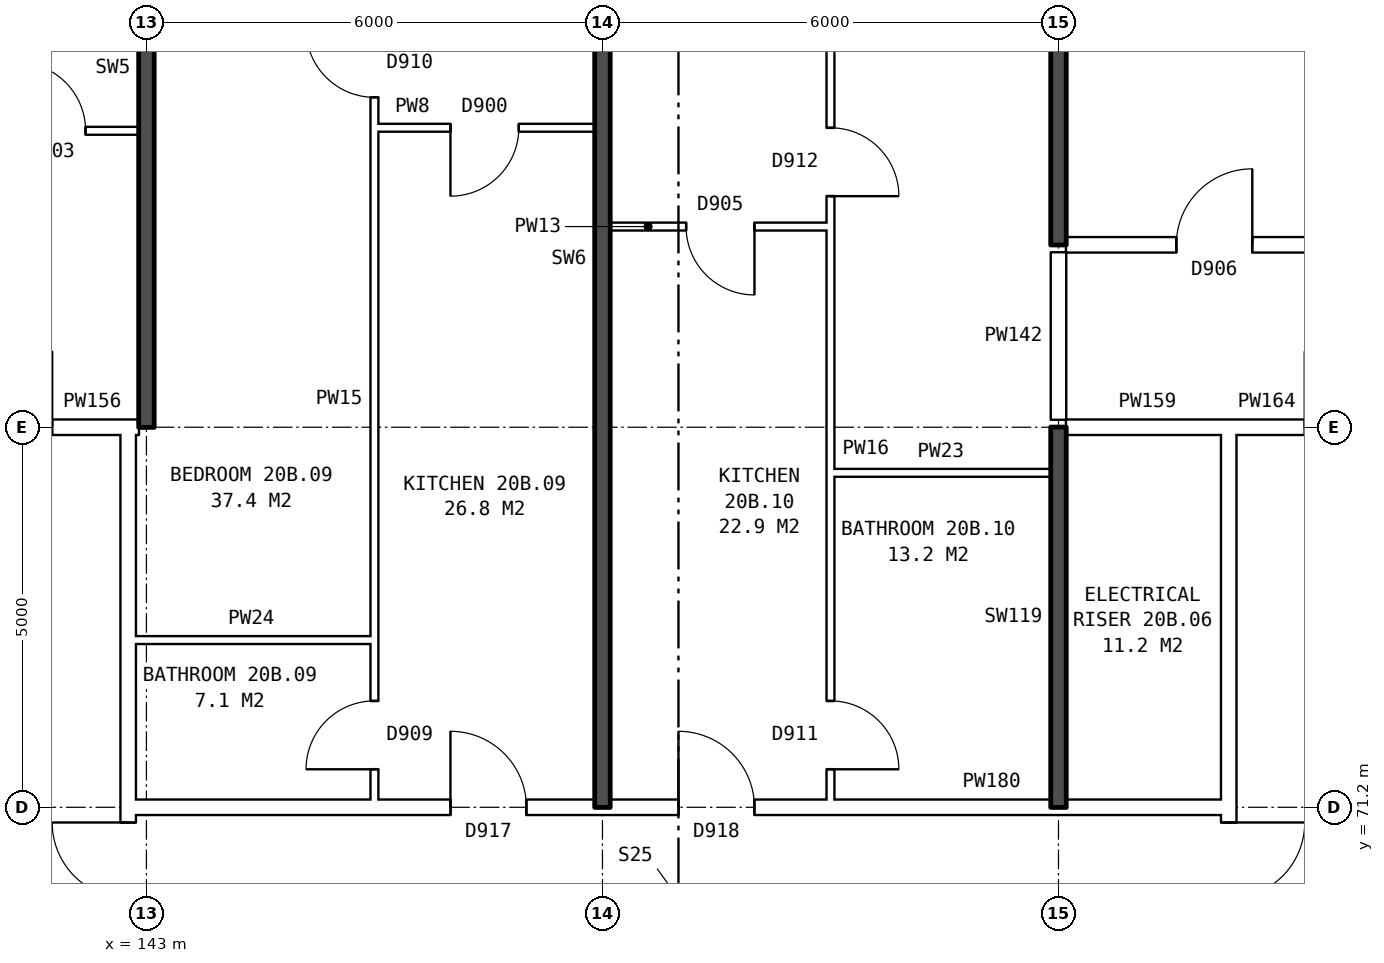
"""IFC4 building model, lengths in metres.
Left out: names, types, materials, properties, quantities, classifications, styles, units other than length and angle.
Written with IfcOpenShell. Run it as: python <this file> out.ifc"""

import sys

from ifc_helpers import new_model, si_unit, direction, frame, frame_2d, origin, place, context, subcontext, project, spatial, rectangle, extrude, element, fill, save


model = new_model("IFC4")
c1 = context("Model", 3, precision=1e-05, world=origin(), true_north=direction((0.0, 1.0)))
c2 = subcontext(c1, "Body", "Model", "MODEL_VIEW")
j1 = project(units=[si_unit("LENGTHUNIT", "METRE"), si_unit("PLANEANGLEUNIT", "RADIAN")], contexts=[c1])
p1 = place(None, origin())
s1 = spatial("IfcSite", under=j1, at=p1, CompositionType="ELEMENT")
p2 = place(p1, origin())
s2 = spatial("IfcBuilding", under=s1, at=p2, CompositionType="ELEMENT")
p3 = place(p2, frame((0.0, 0.0, 74.7)))
s3 = spatial("IfcBuildingStorey", under=s2, at=p3, CompositionType="ELEMENT", Elevation=74.7)
p4 = place(p3, frame((142.76, 63.9, 0.0), z_axis=(0.0, 0.0, 1.0), x_axis=(0.0, 1.0, 0.0)))
e1 = element("IfcWall", 1, at=p4, inside=s3, PredefinedType="PARTITIONING", context=c2, shape_type="SweptSolid", body=[
    extrude(rectangle(XDim=12.2, YDim=0.2, at=frame_2d((6.1, 0.0))), origin(), (0.0, 0.0, 1.0), 2.85),
])
p5 = place(p4, frame((5.1, 0.0, 0.0)))
e2 = element("IfcOpeningElement", 2, at=p5, cuts=e1, PredefinedType="OPENING", context=c2, shape_type="SweptSolid", body=[
    extrude(rectangle(XDim=2.0, YDim=2.1, at=frame_2d((1.0, 1.05))), frame((0.0, 0.11, 0.0), z_axis=(0.0, -1.0, 0.0), x_axis=(1.0, 0.0, 0.0)), (0.0, 0.0, 1.0), 0.22),
])
p6 = place(p3, frame((157.24, 63.9, 0.0), z_axis=(0.0, 0.0, 1.0), x_axis=(0.0, 1.0, 0.0)))
e3 = element("IfcWall", 3, at=p6, inside=s3, PredefinedType="PARTITIONING", context=c2, shape_type="SweptSolid", body=[
    extrude(rectangle(XDim=12.2, YDim=0.2, at=frame_2d((6.1, 0.0))), origin(), (0.0, 0.0, 1.0), 2.85),
])
p7 = place(p6, frame((5.1, 0.0, 0.0)))
e4 = element("IfcOpeningElement", 4, at=p7, cuts=e3, PredefinedType="OPENING", context=c2, shape_type="SweptSolid", body=[
    extrude(rectangle(XDim=2.0, YDim=2.1, at=frame_2d((1.0, 1.05))), frame((0.0, 0.11, 0.0), z_axis=(0.0, -1.0, 0.0), x_axis=(1.0, 0.0, 0.0)), (0.0, 0.0, 1.0), 0.22),
])
p8 = place(p3, frame((142.76, 71.2, 0.0), z_axis=(0.0, 0.0, 1.0), x_axis=(1.0, 0.0, 0.0)))
e5 = element("IfcWall", 5, at=p8, inside=s3, PredefinedType="PARTITIONING", context=c2, shape_type="SweptSolid", body=[
    extrude(rectangle(XDim=14.48, YDim=0.2, at=frame_2d((7.24, 0.0))), origin(), (0.0, 0.0, 1.0), 2.85),
])
p9 = place(p8, frame((4.24, 0.0, 0.0)))
e6 = element("IfcOpeningElement", 6, at=p9, cuts=e5, PredefinedType="OPENING", context=c2, shape_type="SweptSolid", body=[
    extrude(rectangle(XDim=1.0, YDim=2.1, at=frame_2d((0.5, 1.05))), frame((0.0, 0.11, 0.0), z_axis=(0.0, -1.0, 0.0), x_axis=(1.0, 0.0, 0.0)), (0.0, 0.0, 1.0), 0.22),
])
p10 = place(p8, frame((7.24, 0.0, 0.0)))
e7 = element("IfcOpeningElement", 7, at=p10, cuts=e5, PredefinedType="OPENING", context=c2, shape_type="SweptSolid", body=[
    extrude(rectangle(XDim=1.0, YDim=2.1, at=frame_2d((0.5, 1.05))), frame((0.0, 0.11, 0.0), z_axis=(0.0, -1.0, 0.0), x_axis=(1.0, 0.0, 0.0)), (0.0, 0.0, 1.0), 0.22),
])
p11 = place(p3, frame((142.76, 73.4, 0.0), z_axis=(0.0, 0.0, 1.0), x_axis=(1.0, 0.0, 0.0)))
e8 = element("IfcWall", 8, at=p11, inside=s3, PredefinedType="PARTITIONING", context=c2, shape_type="SweptSolid", body=[
    extrude(rectangle(XDim=3.24, YDim=0.1, at=frame_2d((1.62, 0.0))), origin(), (0.0, 0.0, 1.0), 2.85),
])
p12 = place(p3, frame((152.0, 75.6, 0.0), z_axis=(0.0, 0.0, 1.0), x_axis=(1.0, 0.0, 0.0)))
e9 = element("IfcWall", 9, at=p12, inside=s3, PredefinedType="PARTITIONING", context=c2, shape_type="SweptSolid", body=[
    extrude(rectangle(XDim=2.9, YDim=0.1, at=frame_2d((1.45, 0.0))), origin(), (0.0, 0.0, 1.0), 2.85),
])
p13 = place(p3, frame((139.76, 76.2, 0.0), z_axis=(0.0, 0.0, 1.0), x_axis=(1.0, 0.0, 0.0)))
e10 = element("IfcWall", 10, at=p13, inside=s3, PredefinedType="PARTITIONING", context=c2, shape_type="SweptSolid", body=[
    extrude(rectangle(XDim=3.0, YDim=0.2, at=frame_2d((1.5, 0.0))), origin(), (0.0, 0.0, 1.0), 2.85),
])
p14 = place(p13, frame((1.0, 0.0, 0.0)))
e11 = element("IfcOpeningElement", 11, at=p14, cuts=e10, PredefinedType="OPENING", context=c2, shape_type="SweptSolid", body=[
    extrude(rectangle(XDim=1.0, YDim=2.1, at=frame_2d((0.5, 1.05))), frame((0.0, 0.11, 0.0), z_axis=(0.0, -1.0, 0.0), x_axis=(1.0, 0.0, 0.0)), (0.0, 0.0, 1.0), 0.22),
])
p15 = place(p3, frame((142.76, 76.2, 0.0), z_axis=(0.0, 0.0, 1.0), x_axis=(1.0, 0.0, 0.0)))
e12 = element("IfcWall", 12, at=p15, inside=s3, PredefinedType="PARTITIONING", context=c2, shape_type="SweptSolid", body=[
    extrude(rectangle(XDim=0.14, YDim=0.2, at=frame_2d((0.07, 0.0))), origin(), (0.0, 0.0, 1.0), 2.85),
])
p16 = place(p3, frame((155.1, 76.2, 0.0), z_axis=(0.0, 0.0, 1.0), x_axis=(1.0, 0.0, 0.0)))
e13 = element("IfcWall", 13, at=p16, inside=s3, PredefinedType="PARTITIONING", context=c2, shape_type="SweptSolid", body=[
    extrude(rectangle(XDim=2.14, YDim=0.2, at=frame_2d((1.07, 0.0))), origin(), (0.0, 0.0, 1.0), 2.85),
])
p17 = place(p3, frame((157.24, 76.2, 0.0), z_axis=(0.0, 0.0, 1.0), x_axis=(1.0, 0.0, 0.0)))
e14 = element("IfcWall", 14, at=p17, inside=s3, PredefinedType="PARTITIONING", context=c2, shape_type="SweptSolid", body=[
    extrude(rectangle(XDim=3.0, YDim=0.2, at=frame_2d((1.5, 0.0))), origin(), (0.0, 0.0, 1.0), 2.85),
])
p18 = place(p17, frame((1.0, 0.0, 0.0)))
e15 = element("IfcOpeningElement", 15, at=p18, cuts=e14, PredefinedType="OPENING", context=c2, shape_type="SweptSolid", body=[
    extrude(rectangle(XDim=1.0, YDim=2.1, at=frame_2d((0.5, 1.05))), frame((0.0, 0.11, 0.0), z_axis=(0.0, -1.0, 0.0), x_axis=(1.0, 0.0, 0.0)), (0.0, 0.0, 1.0), 0.22),
])
p19 = place(p3, frame((155.1, 78.6, 0.0), z_axis=(0.0, 0.0, 1.0), x_axis=(1.0, 0.0, 0.0)))
e16 = element("IfcWall", 16, at=p19, inside=s3, PredefinedType="PARTITIONING", context=c2, shape_type="SweptSolid", body=[
    extrude(rectangle(XDim=19.79, YDim=0.2, at=frame_2d((9.895, 0.0))), origin(), (0.0, 0.0, 1.0), 2.85),
])
p20 = place(p19, frame((1.45, 0.0, 0.0)))
e17 = element("IfcOpeningElement", 17, at=p20, cuts=e16, PredefinedType="OPENING", context=c2, shape_type="SweptSolid", body=[
    extrude(rectangle(XDim=1.0, YDim=2.1, at=frame_2d((0.5, 1.05))), frame((0.0, 0.11, 0.0), z_axis=(0.0, -1.0, 0.0), x_axis=(1.0, 0.0, 0.0)), (0.0, 0.0, 1.0), 0.22),
])
p21 = place(p19, frame((9.6, 0.0, 0.0)))
e18 = element("IfcOpeningElement", 18, at=p21, cuts=e16, PredefinedType="OPENING", context=c2, shape_type="SweptSolid", body=[
    extrude(rectangle(XDim=1.0, YDim=2.1, at=frame_2d((0.5, 1.05))), frame((0.0, 0.11, 0.0), z_axis=(0.0, -1.0, 0.0), x_axis=(1.0, 0.0, 0.0)), (0.0, 0.0, 1.0), 0.22),
])
p22 = place(p19, frame((13.2, 0.0, 0.0)))
e19 = element("IfcOpeningElement", 19, at=p22, cuts=e16, PredefinedType="OPENING", context=c2, shape_type="SweptSolid", body=[
    extrude(rectangle(XDim=1.0, YDim=2.1, at=frame_2d((0.5, 1.05))), frame((0.0, 0.11, 0.0), z_axis=(0.0, -1.0, 0.0), x_axis=(1.0, 0.0, 0.0)), (0.0, 0.0, 1.0), 0.22),
])
p23 = place(p3, frame((149.1, 78.84, 0.0), z_axis=(0.0, 0.0, 1.0), x_axis=(1.0, 0.0, 0.0)))
e20 = element("IfcWall", 20, at=p23, inside=s3, PredefinedType="PARTITIONING", context=c2, shape_type="SweptSolid", body=[
    extrude(rectangle(XDim=2.9, YDim=0.1, at=frame_2d((1.45, 0.0))), origin(), (0.0, 0.0, 1.0), 2.85),
])
p24 = place(p23, frame((1.0, 0.0, 0.0)))
e21 = element("IfcOpeningElement", 21, at=p24, cuts=e20, PredefinedType="OPENING", context=c2, shape_type="SweptSolid", body=[
    extrude(rectangle(XDim=0.9, YDim=2.1, at=frame_2d((0.45, 1.05))), frame((0.0, 0.06, 0.0), z_axis=(0.0, -1.0, 0.0), x_axis=(1.0, 0.0, 0.0)), (0.0, 0.0, 1.0), 0.12),
])
p25 = place(p3, frame((137.1, 80.1, 0.0), z_axis=(0.0, 0.0, 1.0), x_axis=(1.0, 0.0, 0.0)))
e22 = element("IfcWall", 22, at=p25, inside=s3, PredefinedType="PARTITIONING", context=c2, shape_type="SweptSolid", body=[
    extrude(rectangle(XDim=5.8, YDim=0.1, at=frame_2d((2.9, 0.0))), origin(), (0.0, 0.0, 1.0), 2.85),
])
p26 = place(p25, frame((1.3, 0.0, 0.0)))
e23 = element("IfcOpeningElement", 23, at=p26, cuts=e22, PredefinedType="OPENING", context=c2, shape_type="SweptSolid", body=[
    extrude(rectangle(XDim=0.9, YDim=2.1, at=frame_2d((0.45, 1.05))), frame((0.0, 0.06, 0.0), z_axis=(0.0, -1.0, 0.0), x_axis=(1.0, 0.0, 0.0)), (0.0, 0.0, 1.0), 0.12),
])
p27 = place(p25, frame((4.2, 0.0, 0.0)))
e24 = element("IfcOpeningElement", 24, at=p27, cuts=e22, PredefinedType="OPENING", context=c2, shape_type="SweptSolid", body=[
    extrude(rectangle(XDim=0.9, YDim=2.1, at=frame_2d((0.45, 1.05))), frame((0.0, 0.06, 0.0), z_axis=(0.0, -1.0, 0.0), x_axis=(1.0, 0.0, 0.0)), (0.0, 0.0, 1.0), 0.12),
])
p28 = place(p3, frame((146.0, 80.14, 0.0), z_axis=(0.0, 0.0, 1.0), x_axis=(1.0, 0.0, 0.0)))
e25 = element("IfcWall", 25, at=p28, inside=s3, PredefinedType="PARTITIONING", context=c2, shape_type="SweptSolid", body=[
    extrude(rectangle(XDim=2.9, YDim=0.1, at=frame_2d((1.45, 0.0))), origin(), (0.0, 0.0, 1.0), 2.85),
])
p29 = place(p28, frame((1.0, 0.0, 0.0)))
e26 = element("IfcOpeningElement", 26, at=p29, cuts=e25, PredefinedType="OPENING", context=c2, shape_type="SweptSolid", body=[
    extrude(rectangle(XDim=0.9, YDim=2.1, at=frame_2d((0.45, 1.05))), frame((0.0, 0.06, 0.0), z_axis=(0.0, -1.0, 0.0), x_axis=(1.0, 0.0, 0.0)), (0.0, 0.0, 1.0), 0.12),
])
p30 = place(p3, frame((143.0, 76.2, 0.0), z_axis=(0.0, 0.0, 1.0), x_axis=(0.0, 1.0, 0.0)))
e27 = element("IfcWall", 27, at=p30, inside=s3, PredefinedType="SOLIDWALL", context=c2, shape_type="SweptSolid", body=[
    extrude(rectangle(XDim=9.44, YDim=0.2, at=frame_2d((4.72, 0.0))), origin(), (0.0, 0.0, 1.0), 2.85),
])
p31 = place(p3, frame((146.0, 71.3, 0.0), z_axis=(0.0, 0.0, 1.0), x_axis=(0.0, 1.0, 0.0)))
e28 = element("IfcWall", 28, at=p31, inside=s3, PredefinedType="PARTITIONING", context=c2, shape_type="SweptSolid", body=[
    extrude(rectangle(XDim=14.34, YDim=0.1, at=frame_2d((7.17, 0.0))), origin(), (0.0, 0.0, 1.0), 2.85),
])
p32 = place(p31, frame((9.24, 0.0, 0.0)))
e29 = element("IfcOpeningElement", 29, at=p32, cuts=e28, PredefinedType="OPENING", context=c2, shape_type="SweptSolid", body=[
    extrude(rectangle(XDim=0.9, YDim=2.1, at=frame_2d((0.45, 1.05))), frame((0.0, 0.06, 0.0), z_axis=(0.0, -1.0, 0.0), x_axis=(1.0, 0.0, 0.0)), (0.0, 0.0, 1.0), 0.12),
])
p33 = place(p31, frame((0.4, 0.0, 0.0)))
e30 = element("IfcOpeningElement", 30, at=p33, cuts=e28, PredefinedType="OPENING", context=c2, shape_type="SweptSolid", body=[
    extrude(rectangle(XDim=0.9, YDim=2.1, at=frame_2d((0.45, 1.05))), frame((0.0, 0.06, 0.0), z_axis=(0.0, -1.0, 0.0), x_axis=(1.0, 0.0, 0.0)), (0.0, 0.0, 1.0), 0.12),
])
p34 = place(p3, frame((149.0, 71.2, 0.0), z_axis=(0.0, 0.0, 1.0), x_axis=(0.0, 1.0, 0.0)))
e31 = element("IfcWall", 31, at=p34, inside=s3, PredefinedType="SOLIDWALL", context=c2, shape_type="SweptSolid", body=[
    extrude(rectangle(XDim=14.44, YDim=0.2, at=frame_2d((7.22, 0.0))), origin(), (0.0, 0.0, 1.0), 2.85),
])
p35 = place(p3, frame((152.0, 71.3, 0.0), z_axis=(0.0, 0.0, 1.0), x_axis=(0.0, 1.0, 0.0)))
e32 = element("IfcWall", 32, at=p35, inside=s3, PredefinedType="PARTITIONING", context=c2, shape_type="SweptSolid", body=[
    extrude(rectangle(XDim=14.34, YDim=0.1, at=frame_2d((7.17, 0.0))), origin(), (0.0, 0.0, 1.0), 2.85),
])
p36 = place(p35, frame((7.94, 0.0, 0.0)))
e33 = element("IfcOpeningElement", 33, at=p36, cuts=e32, PredefinedType="OPENING", context=c2, shape_type="SweptSolid", body=[
    extrude(rectangle(XDim=0.9, YDim=2.1, at=frame_2d((0.45, 1.05))), frame((0.0, 0.06, 0.0), z_axis=(0.0, -1.0, 0.0), x_axis=(1.0, 0.0, 0.0)), (0.0, 0.0, 1.0), 0.12),
])
p37 = place(p35, frame((0.4, 0.0, 0.0)))
e34 = element("IfcOpeningElement", 34, at=p37, cuts=e32, PredefinedType="OPENING", context=c2, shape_type="SweptSolid", body=[
    extrude(rectangle(XDim=0.9, YDim=2.1, at=frame_2d((0.45, 1.05))), frame((0.0, 0.06, 0.0), z_axis=(0.0, -1.0, 0.0), x_axis=(1.0, 0.0, 0.0)), (0.0, 0.0, 1.0), 0.12),
])
p38 = place(p3, frame((155.0, 71.2, 0.0), z_axis=(0.0, 0.0, 1.0), x_axis=(0.0, 1.0, 0.0)))
e35 = element("IfcWall", 35, at=p38, inside=s3, PredefinedType="SOLIDWALL", context=c2, shape_type="SweptSolid", body=[
    extrude(rectangle(XDim=5.0, YDim=0.2, at=frame_2d((2.5, 0.0))), origin(), (0.0, 0.0, 1.0), 2.85),
])
p39 = place(p3, frame((155.0, 76.3, 0.0), z_axis=(0.0, 0.0, 1.0), x_axis=(0.0, 1.0, 0.0)))
e36 = element("IfcWall", 36, at=p39, inside=s3, PredefinedType="PARTITIONING", context=c2, shape_type="SweptSolid", body=[
    extrude(rectangle(XDim=2.2, YDim=0.2, at=frame_2d((1.1, 0.0))), origin(), (0.0, 0.0, 1.0), 2.85),
])
p40 = place(p3, frame((155.0, 78.6, 0.0), z_axis=(0.0, 0.0, 1.0), x_axis=(0.0, 1.0, 0.0)))
e37 = element("IfcWall", 37, at=p40, inside=s3, PredefinedType="SOLIDWALL", context=c2, shape_type="SweptSolid", body=[
    extrude(rectangle(XDim=7.04, YDim=0.2, at=frame_2d((3.52, 0.0))), origin(), (0.0, 0.0, 1.0), 2.85),
])
p41 = place(p5, origin())
e38 = element("IfcDoor", 38, at=p41, inside=s3, OperationType="DOUBLE_DOOR_SINGLE_SWING", PredefinedType="DOOR", context=c2, shape_type="SweptSolid", body=[
    extrude(rectangle(XDim=2.0, YDim=2.1, at=frame_2d((1.0, 1.05))), frame((0.0, 0.025, 0.0), z_axis=(0.0, -1.0, 0.0), x_axis=(1.0, 0.0, 0.0)), (0.0, 0.0, 1.0), 0.05),
])
fill(e2, e38)
p42 = place(p7, frame((2.0, 0.0, 0.0), z_axis=(0.0, 0.0, 1.0), x_axis=(-1.0, 0.0, 0.0)))
e39 = element("IfcDoor", 39, at=p42, inside=s3, OperationType="DOUBLE_DOOR_SINGLE_SWING", PredefinedType="DOOR", context=c2, shape_type="SweptSolid", body=[
    extrude(rectangle(XDim=2.0, YDim=2.1, at=frame_2d((1.0, 1.05))), frame((0.0, 0.025, 0.0), z_axis=(0.0, -1.0, 0.0), x_axis=(1.0, 0.0, 0.0)), (0.0, 0.0, 1.0), 0.05),
])
fill(e4, e39)
p43 = place(p27, origin())
e40 = element("IfcDoor", 40, at=p43, inside=s3, OperationType="SINGLE_SWING_LEFT", PredefinedType="DOOR", context=c2, shape_type="SweptSolid", body=[
    extrude(rectangle(XDim=0.9, YDim=2.1, at=frame_2d((0.45, 1.05))), frame((0.0, 0.025, 0.0), z_axis=(0.0, -1.0, 0.0), x_axis=(1.0, 0.0, 0.0)), (0.0, 0.0, 1.0), 0.05),
])
fill(e24, e40)
p44 = place(p32, origin())
e41 = element("IfcDoor", 41, at=p44, inside=s3, OperationType="SINGLE_SWING_RIGHT", PredefinedType="DOOR", context=c2, shape_type="SweptSolid", body=[
    extrude(rectangle(XDim=0.9, YDim=2.1, at=frame_2d((0.45, 1.05))), frame((0.0, 0.025, 0.0), z_axis=(0.0, -1.0, 0.0), x_axis=(1.0, 0.0, 0.0)), (0.0, 0.0, 1.0), 0.05),
])
fill(e29, e41)
p45 = place(p9, origin())
e42 = element("IfcDoor", 42, at=p45, inside=s3, OperationType="SINGLE_SWING_LEFT", PredefinedType="DOOR", context=c2, shape_type="SweptSolid", body=[
    extrude(rectangle(XDim=1.0, YDim=2.1, at=frame_2d((0.5, 1.05))), frame((0.0, 0.025, 0.0), z_axis=(0.0, -1.0, 0.0), x_axis=(1.0, 0.0, 0.0)), (0.0, 0.0, 1.0), 0.05),
])
fill(e6, e42)
p46 = place(p29, frame((0.9, 0.0, 0.0), z_axis=(0.0, 0.0, 1.0), x_axis=(-1.0, 0.0, 0.0)))
e43 = element("IfcDoor", 43, at=p46, inside=s3, OperationType="SINGLE_SWING_RIGHT", PredefinedType="DOOR", context=c2, shape_type="SweptSolid", body=[
    extrude(rectangle(XDim=0.9, YDim=2.1, at=frame_2d((0.45, 1.05))), frame((0.0, 0.025, 0.0), z_axis=(0.0, -1.0, 0.0), x_axis=(1.0, 0.0, 0.0)), (0.0, 0.0, 1.0), 0.05),
])
fill(e26, e43)
p47 = place(p33, origin())
e44 = element("IfcDoor", 44, at=p47, inside=s3, OperationType="SINGLE_SWING_LEFT", PredefinedType="DOOR", context=c2, shape_type="SweptSolid", body=[
    extrude(rectangle(XDim=0.9, YDim=2.1, at=frame_2d((0.45, 1.05))), frame((0.0, 0.025, 0.0), z_axis=(0.0, -1.0, 0.0), x_axis=(1.0, 0.0, 0.0)), (0.0, 0.0, 1.0), 0.05),
])
fill(e30, e44)
p48 = place(p36, frame((0.9, 0.0, 0.0), z_axis=(0.0, 0.0, 1.0), x_axis=(-1.0, 0.0, 0.0)))
e45 = element("IfcDoor", 45, at=p48, inside=s3, OperationType="SINGLE_SWING_RIGHT", PredefinedType="DOOR", context=c2, shape_type="SweptSolid", body=[
    extrude(rectangle(XDim=0.9, YDim=2.1, at=frame_2d((0.45, 1.05))), frame((0.0, 0.025, 0.0), z_axis=(0.0, -1.0, 0.0), x_axis=(1.0, 0.0, 0.0)), (0.0, 0.0, 1.0), 0.05),
])
fill(e33, e45)
p49 = place(p10, origin())
e46 = element("IfcDoor", 46, at=p49, inside=s3, OperationType="SINGLE_SWING_LEFT", PredefinedType="DOOR", context=c2, shape_type="SweptSolid", body=[
    extrude(rectangle(XDim=1.0, YDim=2.1, at=frame_2d((0.5, 1.05))), frame((0.0, 0.025, 0.0), z_axis=(0.0, -1.0, 0.0), x_axis=(1.0, 0.0, 0.0)), (0.0, 0.0, 1.0), 0.05),
])
fill(e7, e46)
p50 = place(p24, frame((0.9, 0.0, 0.0), z_axis=(0.0, 0.0, 1.0), x_axis=(-1.0, 0.0, 0.0)))
e47 = element("IfcDoor", 47, at=p50, inside=s3, OperationType="SINGLE_SWING_LEFT", PredefinedType="DOOR", context=c2, shape_type="SweptSolid", body=[
    extrude(rectangle(XDim=0.9, YDim=2.1, at=frame_2d((0.45, 1.05))), frame((0.0, 0.025, 0.0), z_axis=(0.0, -1.0, 0.0), x_axis=(1.0, 0.0, 0.0)), (0.0, 0.0, 1.0), 0.05),
])
fill(e21, e47)
p51 = place(p37, frame((0.9, 0.0, 0.0), z_axis=(0.0, 0.0, 1.0), x_axis=(-1.0, 0.0, 0.0)))
e48 = element("IfcDoor", 48, at=p51, inside=s3, OperationType="SINGLE_SWING_RIGHT", PredefinedType="DOOR", context=c2, shape_type="SweptSolid", body=[
    extrude(rectangle(XDim=0.9, YDim=2.1, at=frame_2d((0.45, 1.05))), frame((0.0, 0.025, 0.0), z_axis=(0.0, -1.0, 0.0), x_axis=(1.0, 0.0, 0.0)), (0.0, 0.0, 1.0), 0.05),
])
fill(e34, e48)
p52 = place(p20, origin())
e49 = element("IfcDoor", 49, at=p52, inside=s3, OperationType="SINGLE_SWING_RIGHT", PredefinedType="DOOR", context=c2, shape_type="SweptSolid", body=[
    extrude(rectangle(XDim=1.0, YDim=2.1, at=frame_2d((0.5, 1.05))), frame((0.0, 0.025, 0.0), z_axis=(0.0, -1.0, 0.0), x_axis=(1.0, 0.0, 0.0)), (0.0, 0.0, 1.0), 0.05),
])
fill(e17, e49)
save(model, sys.argv[1])
